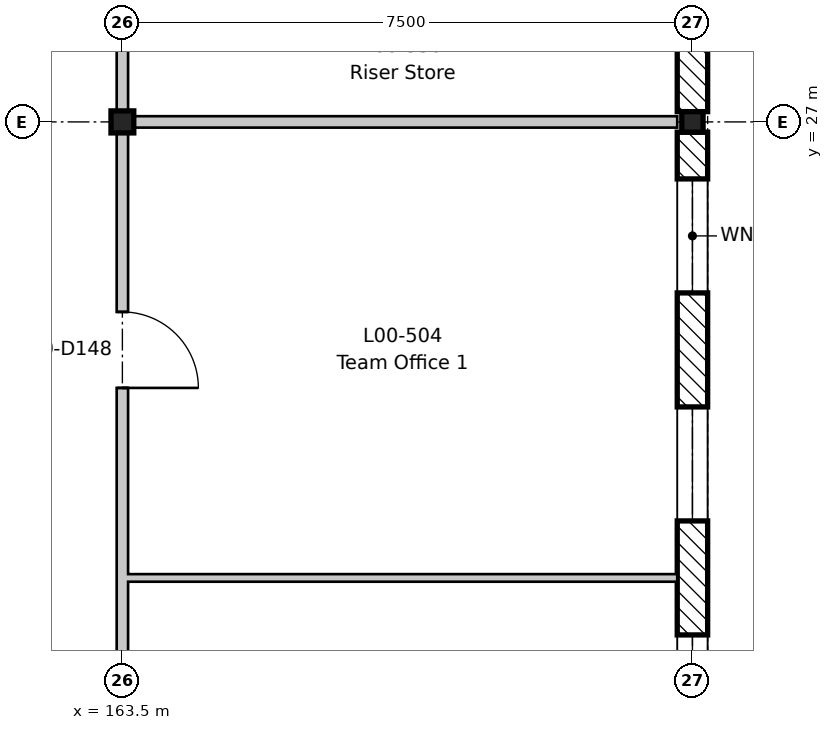
"""IFC4 building model, lengths in metres.
Left out: names, types, materials, properties, quantities, classifications, styles, units other than length and angle.
Written with IfcOpenShell. Run it as: python <this file> out.ifc"""

import sys

from ifc_helpers import new_model, si_unit, direction, frame, frame_2d, origin, origin_2d, place, context, subcontext, project, spatial, rectangle, i_section, extrude, element, fill, save


model = new_model("IFC4")
c1 = context("Model", 3, precision=1e-05, world=origin(), true_north=direction((0.0, 1.0)))
c2 = subcontext(c1, "Body", "Model", "MODEL_VIEW")
j1 = project(units=[si_unit("LENGTHUNIT", "METRE"), si_unit("PLANEANGLEUNIT", "RADIAN")], contexts=[c1])
p1 = place(None, origin())
s1 = spatial("IfcSite", under=j1, at=p1, CompositionType="ELEMENT")
p2 = place(p1, origin())
s2 = spatial("IfcBuilding", under=s1, at=p2, CompositionType="ELEMENT")
p3 = place(p2, origin())
s3 = spatial("IfcBuildingStorey", under=s2, at=p3, CompositionType="ELEMENT", Elevation=0.0)
p4 = place(p3, frame((163.5, 27.0, -0.6), z_axis=(0.0, 0.0, 1.0), x_axis=(1.0, 0.0, 0.0)))
e1 = element("IfcColumn", 1, at=p4, inside=s3, PredefinedType="COLUMN", context=c2, shape_type="SweptSolid", body=[
    extrude(i_section(OverallWidth=0.3, OverallDepth=0.29, WebThickness=0.009, FlangeThickness=0.014, FilletRadius=0.027, at=origin_2d()), origin(), (0.0, 0.0, 1.0), 5.8),
])
p5 = place(p3, frame((171.0, 27.0, -0.6), z_axis=(0.0, 0.0, 1.0), x_axis=(1.0, 0.0, 0.0)))
e2 = element("IfcColumn", 2, at=p5, inside=s3, PredefinedType="COLUMN", context=c2, shape_type="SweptSolid", body=[
    extrude(i_section(OverallWidth=0.28, OverallDepth=0.27, WebThickness=0.008, FlangeThickness=0.013, FilletRadius=0.024, at=origin_2d()), origin(), (0.0, 0.0, 1.0), 5.8),
])
p6 = place(p3, frame((171.0, 26.865, 0.0), z_axis=(0.0, 0.0, 1.0), x_axis=(0.0, -1.0, 0.0)))
e3 = element("IfcWall", 3, at=p6, inside=s3, PredefinedType="STANDARD", context=c2, shape_type="SweptSolid", body=[
    extrude(rectangle(XDim=8.73, YDim=0.4, at=frame_2d((4.365, 0.0))), origin(), (0.0, 0.0, 1.0), 4.8),
])
p7 = place(p6, frame((6.615, 0.0, 0.3)))
e4 = element("IfcOpeningElement", 4, at=p7, cuts=e3, PredefinedType="OPENING", context=c2, shape_type="SweptSolid", body=[
    extrude(rectangle(XDim=1.5, YDim=3.3, at=frame_2d((0.75, 1.65))), frame((0.0, 0.21, 0.0), z_axis=(0.0, -1.0, 0.0), x_axis=(1.0, 0.0, 0.0)), (0.0, 0.0, 1.0), 0.42),
])
p8 = place(p6, frame((3.615, 0.0, 0.3)))
e5 = element("IfcOpeningElement", 5, at=p8, cuts=e3, PredefinedType="OPENING", context=c2, shape_type="SweptSolid", body=[
    extrude(rectangle(XDim=1.5, YDim=3.3, at=frame_2d((0.75, 1.65))), frame((0.0, 0.21, 0.0), z_axis=(0.0, -1.0, 0.0), x_axis=(1.0, 0.0, 0.0)), (0.0, 0.0, 1.0), 0.42),
])
p9 = place(p6, frame((0.615, 0.0, 0.3)))
e6 = element("IfcOpeningElement", 6, at=p9, cuts=e3, PredefinedType="OPENING", context=c2, shape_type="SweptSolid", body=[
    extrude(rectangle(XDim=1.5, YDim=3.3, at=frame_2d((0.75, 1.65))), frame((0.0, 0.21, 0.0), z_axis=(0.0, -1.0, 0.0), x_axis=(1.0, 0.0, 0.0)), (0.0, 0.0, 1.0), 0.42),
])
p10 = place(p3, frame((171.0, 35.865, 0.0), z_axis=(0.0, 0.0, 1.0), x_axis=(0.0, -1.0, 0.0)))
e7 = element("IfcWall", 7, at=p10, inside=s3, PredefinedType="STANDARD", context=c2, shape_type="SweptSolid", body=[
    extrude(rectangle(XDim=8.73, YDim=0.4, at=frame_2d((4.365, 0.0))), origin(), (0.0, 0.0, 1.0), 4.8),
])
p11 = place(p10, frame((3.465, 0.0, 0.0)))
e8 = element("IfcOpeningElement", 8, at=p11, cuts=e7, PredefinedType="OPENING", context=c2, shape_type="SweptSolid", body=[
    extrude(rectangle(XDim=1.8, YDim=2.1, at=frame_2d((0.9, 1.05))), frame((0.0, 0.21, 0.0), z_axis=(0.0, -1.0, 0.0), x_axis=(1.0, 0.0, 0.0)), (0.0, 0.0, 1.0), 0.42),
])
p12 = place(p10, frame((0.615, 0.0, 0.3)))
e9 = element("IfcOpeningElement", 9, at=p12, cuts=e7, PredefinedType="OPENING", context=c2, shape_type="SweptSolid", body=[
    extrude(rectangle(XDim=1.5, YDim=3.3, at=frame_2d((0.75, 1.65))), frame((0.0, 0.21, 0.0), z_axis=(0.0, -1.0, 0.0), x_axis=(1.0, 0.0, 0.0)), (0.0, 0.0, 1.0), 0.42),
])
p13 = place(p3, frame((163.575, 21.0, 0.0), z_axis=(0.0, 0.0, 1.0), x_axis=(1.0, 0.0, 0.0)))
e10 = element("IfcWall", 10, at=p13, inside=s3, PredefinedType="PARTITIONING", context=c2, shape_type="SweptSolid", body=[
    extrude(rectangle(XDim=7.225, YDim=0.1, at=frame_2d((3.613, 0.0))), origin(), (0.0, 0.0, 1.0), 5.2),
])
p14 = place(p3, frame((163.575, 27.0, 0.0), z_axis=(0.0, 0.0, 1.0), x_axis=(1.0, 0.0, 0.0)))
e11 = element("IfcWall", 11, at=p14, inside=s3, PredefinedType="PARTITIONING", context=c2, shape_type="SweptSolid", body=[
    extrude(rectangle(XDim=7.225, YDim=0.15, at=frame_2d((3.613, 0.0))), origin(), (0.0, 0.0, 1.0), 4.85),
])
p15 = place(p3, frame((163.5, -8.8, 0.0), z_axis=(0.0, 0.0, 1.0), x_axis=(0.0, 1.0, 0.0)))
e12 = element("IfcWall", 12, at=p15, inside=s3, PredefinedType="PARTITIONING", context=c2, shape_type="SweptSolid", body=[
    extrude(rectangle(XDim=62.6, YDim=0.15, at=frame_2d((31.3, 0.0))), origin(), (0.0, 0.0, 1.0), 4.68),
])
p16 = place(p15, frame((20.3, 0.0, 0.0)))
e13 = element("IfcOpeningElement", 13, at=p16, cuts=e12, PredefinedType="OPENING", context=c2, shape_type="SweptSolid", body=[
    extrude(rectangle(XDim=1.0, YDim=2.1, at=frame_2d((0.5, 1.05))), frame((0.0, 0.085, 0.0), z_axis=(0.0, -1.0, 0.0), x_axis=(1.0, 0.0, 0.0)), (0.0, 0.0, 1.0), 0.17),
])
p17 = place(p15, frame((24.8, 0.0, 0.0)))
e14 = element("IfcOpeningElement", 14, at=p17, cuts=e12, PredefinedType="OPENING", context=c2, shape_type="SweptSolid", body=[
    extrude(rectangle(XDim=1.0, YDim=2.1, at=frame_2d((0.5, 1.05))), frame((0.0, 0.085, 0.0), z_axis=(0.0, -1.0, 0.0), x_axis=(1.0, 0.0, 0.0)), (0.0, 0.0, 1.0), 0.17),
])
p18 = place(p15, frame((27.8, 0.0, 0.0)))
e15 = element("IfcOpeningElement", 15, at=p18, cuts=e12, PredefinedType="OPENING", context=c2, shape_type="SweptSolid", body=[
    extrude(rectangle(XDim=1.0, YDim=2.1, at=frame_2d((0.5, 1.05))), frame((0.0, 0.085, 0.0), z_axis=(0.0, -1.0, 0.0), x_axis=(1.0, 0.0, 0.0)), (0.0, 0.0, 1.0), 0.17),
])
p19 = place(p15, frame((32.3, 0.0, 0.0)))
e16 = element("IfcOpeningElement", 16, at=p19, cuts=e12, PredefinedType="OPENING", context=c2, shape_type="SweptSolid", body=[
    extrude(rectangle(XDim=1.0, YDim=2.1, at=frame_2d((0.5, 1.05))), frame((0.0, 0.085, 0.0), z_axis=(0.0, -1.0, 0.0), x_axis=(1.0, 0.0, 0.0)), (0.0, 0.0, 1.0), 0.17),
])
p20 = place(p15, frame((45.8, 0.0, 0.0)))
e17 = element("IfcOpeningElement", 17, at=p20, cuts=e12, PredefinedType="OPENING", context=c2, shape_type="SweptSolid", body=[
    extrude(rectangle(XDim=1.0, YDim=2.1, at=frame_2d((0.5, 1.05))), frame((0.0, 0.085, 0.0), z_axis=(0.0, -1.0, 0.0), x_axis=(1.0, 0.0, 0.0)), (0.0, 0.0, 1.0), 0.17),
])
p21 = place(p15, frame((50.3, 0.0, 0.0)))
e18 = element("IfcOpeningElement", 18, at=p21, cuts=e12, PredefinedType="OPENING", context=c2, shape_type="SweptSolid", body=[
    extrude(rectangle(XDim=1.0, YDim=2.1, at=frame_2d((0.5, 1.05))), frame((0.0, 0.085, 0.0), z_axis=(0.0, -1.0, 0.0), x_axis=(1.0, 0.0, 0.0)), (0.0, 0.0, 1.0), 0.17),
])
p22 = place(p15, frame((12.6, 0.0, 0.0)))
e19 = element("IfcOpeningElement", 19, at=p22, cuts=e12, PredefinedType="OPENING", context=c2, shape_type="SweptSolid", body=[
    extrude(rectangle(XDim=1.4, YDim=2.1, at=frame_2d((0.7, 1.05))), frame((0.0, 0.085, 0.0), z_axis=(0.0, -1.0, 0.0), x_axis=(1.0, 0.0, 0.0)), (0.0, 0.0, 1.0), 0.17),
])
p23 = place(p15, frame((3.6, 0.0, 0.0)))
e20 = element("IfcOpeningElement", 20, at=p23, cuts=e12, PredefinedType="OPENING", context=c2, shape_type="SweptSolid", body=[
    extrude(rectangle(XDim=1.4, YDim=2.1, at=frame_2d((0.7, 1.05))), frame((0.0, 0.085, 0.0), z_axis=(0.0, -1.0, 0.0), x_axis=(1.0, 0.0, 0.0)), (0.0, 0.0, 1.0), 0.17),
])
p24 = place(p15, frame((57.6, 0.0, 0.0)))
e21 = element("IfcOpeningElement", 21, at=p24, cuts=e12, PredefinedType="OPENING", context=c2, shape_type="SweptSolid", body=[
    extrude(rectangle(XDim=1.4, YDim=2.1, at=frame_2d((0.7, 1.05))), frame((0.0, 0.085, 0.0), z_axis=(0.0, -1.0, 0.0), x_axis=(1.0, 0.0, 0.0)), (0.0, 0.0, 1.0), 0.17),
])
p25 = place(p15, frame((36.75, 0.0, 0.0)))
e22 = element("IfcOpeningElement", 22, at=p25, cuts=e12, PredefinedType="OPENING", context=c2, shape_type="SweptSolid", body=[
    extrude(rectangle(XDim=1.0, YDim=2.1, at=frame_2d((0.5, 1.05))), frame((0.0, 0.085, 0.0), z_axis=(0.0, -1.0, 0.0), x_axis=(1.0, 0.0, 0.0)), (0.0, 0.0, 1.0), 0.17),
])
p26 = place(p15, frame((42.65, 0.0, 0.0)))
e23 = element("IfcOpeningElement", 23, at=p26, cuts=e12, PredefinedType="OPENING", context=c2, shape_type="SweptSolid", body=[
    extrude(rectangle(XDim=1.4, YDim=2.1, at=frame_2d((0.7, 1.05))), frame((0.0, 0.085, 0.0), z_axis=(0.0, -1.0, 0.0), x_axis=(1.0, 0.0, 0.0)), (0.0, 0.0, 1.0), 0.17),
])
p27 = place(p7, origin())
e24 = element("IfcWindow", 24, at=p27, inside=s3, PartitioningType="SINGLE_PANEL", PredefinedType="WINDOW", context=c2, shape_type="SweptSolid", body=[
    extrude(rectangle(XDim=1.5, YDim=3.3, at=frame_2d((0.75, 1.65))), frame((0.0, -0.12, 0.0), z_axis=(0.0, -1.0, 0.0), x_axis=(1.0, 0.0, 0.0)), (0.0, 0.0, 1.0), 0.06),
])
fill(e4, e24)
p28 = place(p8, origin())
e25 = element("IfcWindow", 25, at=p28, inside=s3, PartitioningType="SINGLE_PANEL", PredefinedType="WINDOW", context=c2, shape_type="SweptSolid", body=[
    extrude(rectangle(XDim=1.5, YDim=3.3, at=frame_2d((0.75, 1.65))), frame((0.0, -0.12, 0.0), z_axis=(0.0, -1.0, 0.0), x_axis=(1.0, 0.0, 0.0)), (0.0, 0.0, 1.0), 0.06),
])
fill(e5, e25)
p29 = place(p9, origin())
e26 = element("IfcWindow", 26, at=p29, inside=s3, PartitioningType="SINGLE_PANEL", PredefinedType="WINDOW", context=c2, shape_type="SweptSolid", body=[
    extrude(rectangle(XDim=1.5, YDim=3.3, at=frame_2d((0.75, 1.65))), frame((0.0, -0.12, 0.0), z_axis=(0.0, -1.0, 0.0), x_axis=(1.0, 0.0, 0.0)), (0.0, 0.0, 1.0), 0.06),
])
fill(e6, e26)
p30 = place(p19, frame((1.0, 0.0, 0.0), z_axis=(0.0, 0.0, 1.0), x_axis=(-1.0, 0.0, 0.0)))
e27 = element("IfcDoor", 27, at=p30, inside=s3, OperationType="SINGLE_SWING_RIGHT", PredefinedType="DOOR", context=c2, shape_type="SweptSolid", body=[
    extrude(rectangle(XDim=1.0, YDim=2.1, at=frame_2d((0.5, 1.05))), frame((0.0, 0.025, 0.0), z_axis=(0.0, -1.0, 0.0), x_axis=(1.0, 0.0, 0.0)), (0.0, 0.0, 1.0), 0.05),
])
fill(e16, e27)
save(model, sys.argv[1])
